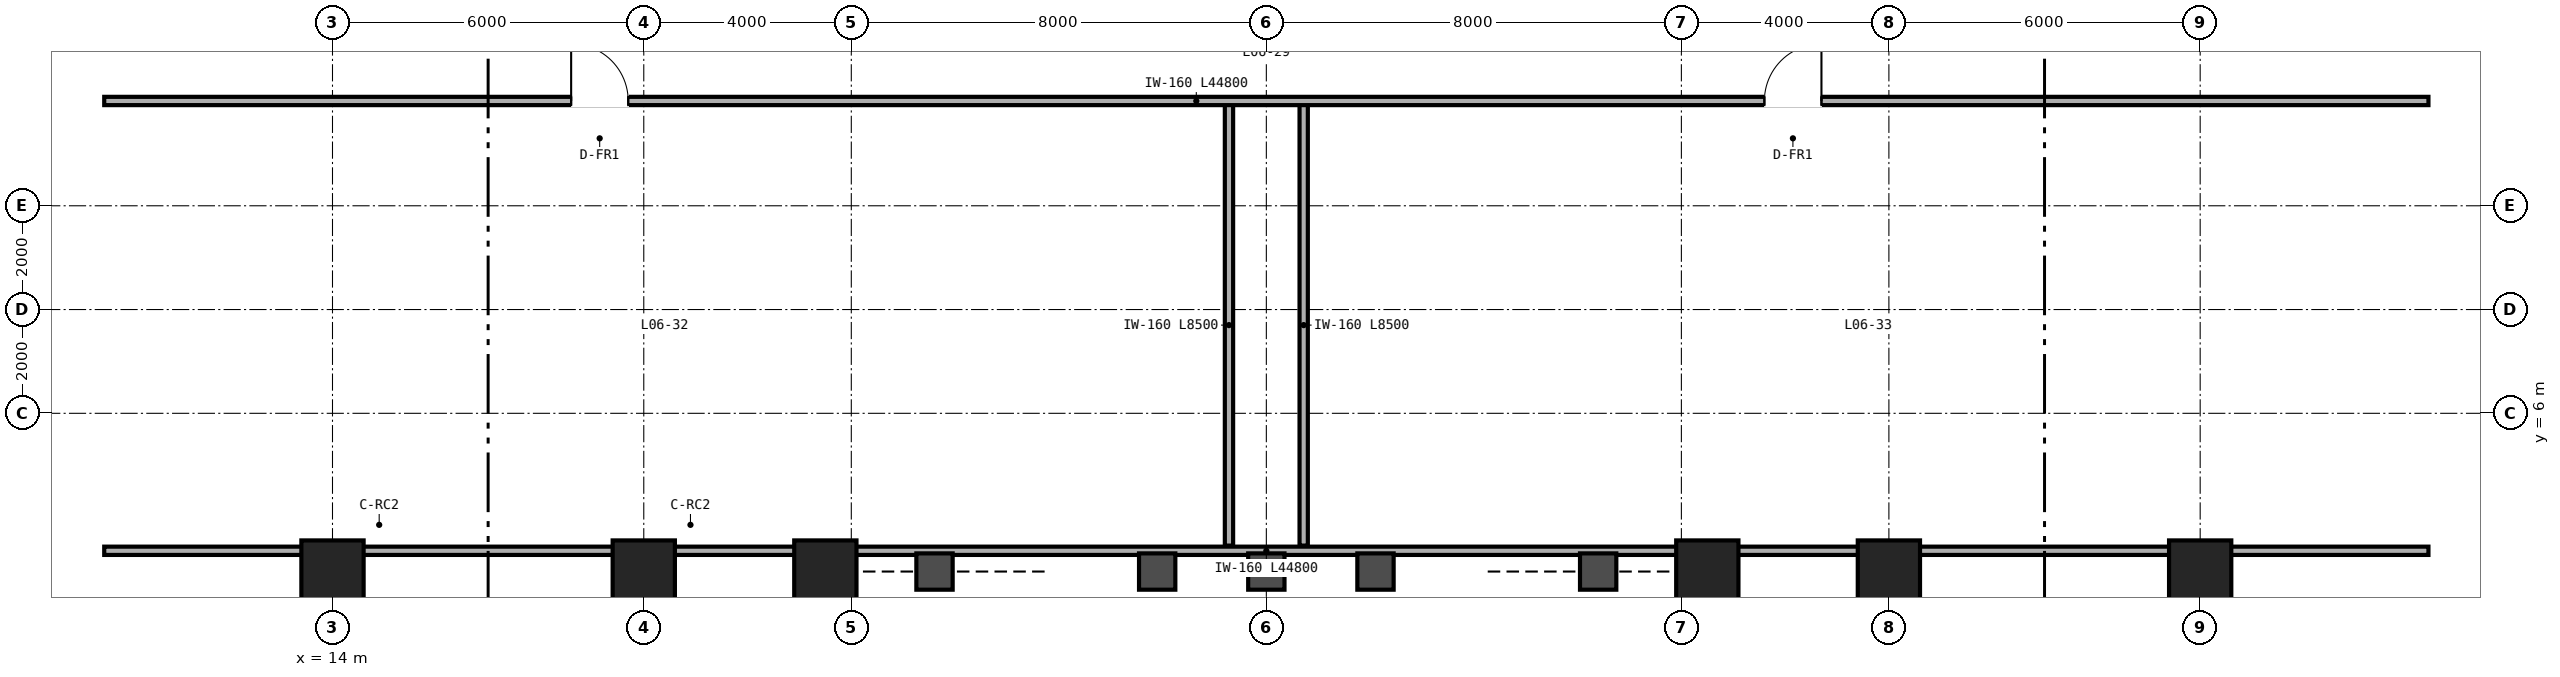
"""IFC4 building model, lengths in metres.
Left out: names, types, materials, properties, quantities, classifications, styles, units other than length and angle.
Written with IfcOpenShell. Run it as: python <this file> out.ifc"""

import sys

from ifc_helpers import new_model, si_unit, direction, frame, frame_2d, origin, origin_2d, place, context, subcontext, project, spatial, rectangle, extrude, source, transform, mapped, element, fill, save


model = new_model("IFC4")
c1 = context("Model", 3, precision=1e-05, world=origin(), true_north=direction((0.0, 1.0)))
c2 = subcontext(c1, "Body", "Model", "MODEL_VIEW")
j1 = project(units=[si_unit("LENGTHUNIT", "METRE"), si_unit("PLANEANGLEUNIT", "RADIAN")], contexts=[c1])
p1 = place(None, origin())
s1 = spatial("IfcSite", under=j1, at=p1, CompositionType="ELEMENT")
p2 = place(p1, origin())
s2 = spatial("IfcBuilding", under=s1, at=p2, CompositionType="ELEMENT")
p3 = place(p2, frame((0.0, 0.0, 28.8)))
s3 = spatial("IfcBuildingStorey", under=s2, at=p3, CompositionType="ELEMENT", Elevation=28.8)
m1 = source(origin(), c2, "Body", "SweptSolid", [
    extrude(rectangle(XDim=1.2, YDim=1.2, at=origin_2d()), origin(), (0.0, 0.0, 1.0), 5.75),
])
for number, where, z_axis, x_axis in (
    (1, (14.0, 2.95, 0.0), (0.0, 0.0, 1.0), (1.0, 0.0, 0.0)),
    (2, (20.0, 2.95, 0.0), (0.0, 0.0, 1.0), (1.0, 0.0, 0.0)),
    (3, (23.5, 2.95, 0.0), (0.0, 0.0, 1.0), (1.0, 0.0, 0.0)),
    (4, (40.5, 2.95, 0.0), (0.0, 0.0, 1.0), (1.0, 0.0, 0.0)),
    (5, (44.0, 2.95, 0.0), (0.0, 0.0, 1.0), (1.0, 0.0, 0.0)),
    (6, (50.0, 2.95, 0.0), (0.0, 0.0, 1.0), (1.0, 0.0, 0.0)),
):
    element("IfcColumn", number, at=place(p3, frame(where, z_axis=z_axis, x_axis=x_axis)), inside=s3, PredefinedType="COLUMN", context=c2, shape_type="MappedRepresentation", body=[
        mapped(m1, transform((0.0, 0.0, 0.0), scale=1.0)),
    ])
p4 = place(p3, frame((9.6, 3.35, 0.0), z_axis=(0.0, 0.0, 1.0), x_axis=(1.0, 0.0, 0.0)))
e7 = element("IfcWall", 7, at=p4, inside=s3, PredefinedType="PARTITIONING", context=c2, shape_type="SweptSolid", body=[
    extrude(rectangle(XDim=44.8, YDim=0.16, at=frame_2d((22.4, 0.0))), origin(), (0.0, 0.0, 1.0), 4.971),
])
for number, where, z_axis, x_axis in (
    (8, (31.28, 3.45, 0.0), (0.0, 0.0, 1.0), (0.0, 1.0, 0.0)),
    (9, (32.72, 3.45, 0.0), (0.0, 0.0, 1.0), (0.0, 1.0, 0.0)),
):
    element("IfcWall", number, at=place(p3, frame(where, z_axis=z_axis, x_axis=x_axis)), inside=s3, PredefinedType="PARTITIONING", context=c2, shape_type="SweptSolid", body=[
        extrude(rectangle(XDim=8.5, YDim=0.16, at=frame_2d((4.25, 0.0))), origin(), (0.0, 0.0, 1.0), 5.75),
    ])
p5 = place(p3, frame((9.6, 12.02, 0.0), z_axis=(0.0, 0.0, 1.0), x_axis=(1.0, 0.0, 0.0)))
e10 = element("IfcWall", 10, at=p5, inside=s3, PredefinedType="PARTITIONING", context=c2, shape_type="SweptSolid", body=[
    extrude(rectangle(XDim=44.8, YDim=0.16, at=frame_2d((22.4, 0.0))), origin(), (0.0, 0.0, 1.0), 4.971),
])
p6 = place(p5, frame((9.0, 0.0, 0.0)))
e11 = element("IfcOpeningElement", 11, at=p6, cuts=e10, PredefinedType="OPENING", context=c2, shape_type="SweptSolid", body=[
    extrude(rectangle(XDim=1.1, YDim=2.15, at=frame_2d((0.55, 1.075))), frame((0.0, 0.09, 0.0), z_axis=(0.0, -1.0, 0.0), x_axis=(1.0, 0.0, 0.0)), (0.0, 0.0, 1.0), 0.18),
])
p7 = place(p5, frame((32.0, 0.0, 0.0)))
e12 = element("IfcOpeningElement", 12, at=p7, cuts=e10, PredefinedType="OPENING", context=c2, shape_type="SweptSolid", body=[
    extrude(rectangle(XDim=1.1, YDim=2.15, at=frame_2d((0.55, 1.075))), frame((0.0, 0.09, 0.0), z_axis=(0.0, -1.0, 0.0), x_axis=(1.0, 0.0, 0.0)), (0.0, 0.0, 1.0), 0.18),
])
m2 = source(origin(), c2, "Body", "SweptSolid", [
    extrude(rectangle(XDim=1.1, YDim=2.15, at=frame_2d((0.55, 1.075))), frame((0.0, 0.025, 0.0), z_axis=(0.0, -1.0, 0.0), x_axis=(1.0, 0.0, 0.0)), (0.0, 0.0, 1.0), 0.05),
])
p8 = place(p6, origin())
e13 = element("IfcDoor", 13, at=p8, inside=s3, OperationType="SINGLE_SWING_LEFT", PredefinedType="DOOR", context=c2, shape_type="MappedRepresentation", body=[
    mapped(m2, transform((0.0, 0.0, 0.0), scale=1.0)),
])
fill(e11, e13)
p9 = place(p7, origin())
e14 = element("IfcDoor", 14, at=p9, inside=s3, OperationType="SINGLE_SWING_RIGHT", PredefinedType="DOOR", context=c2, shape_type="MappedRepresentation", body=[
    mapped(m2, transform((0.0, 0.0, 0.0), scale=1.0)),
])
fill(e12, e14)
save(model, sys.argv[1])
